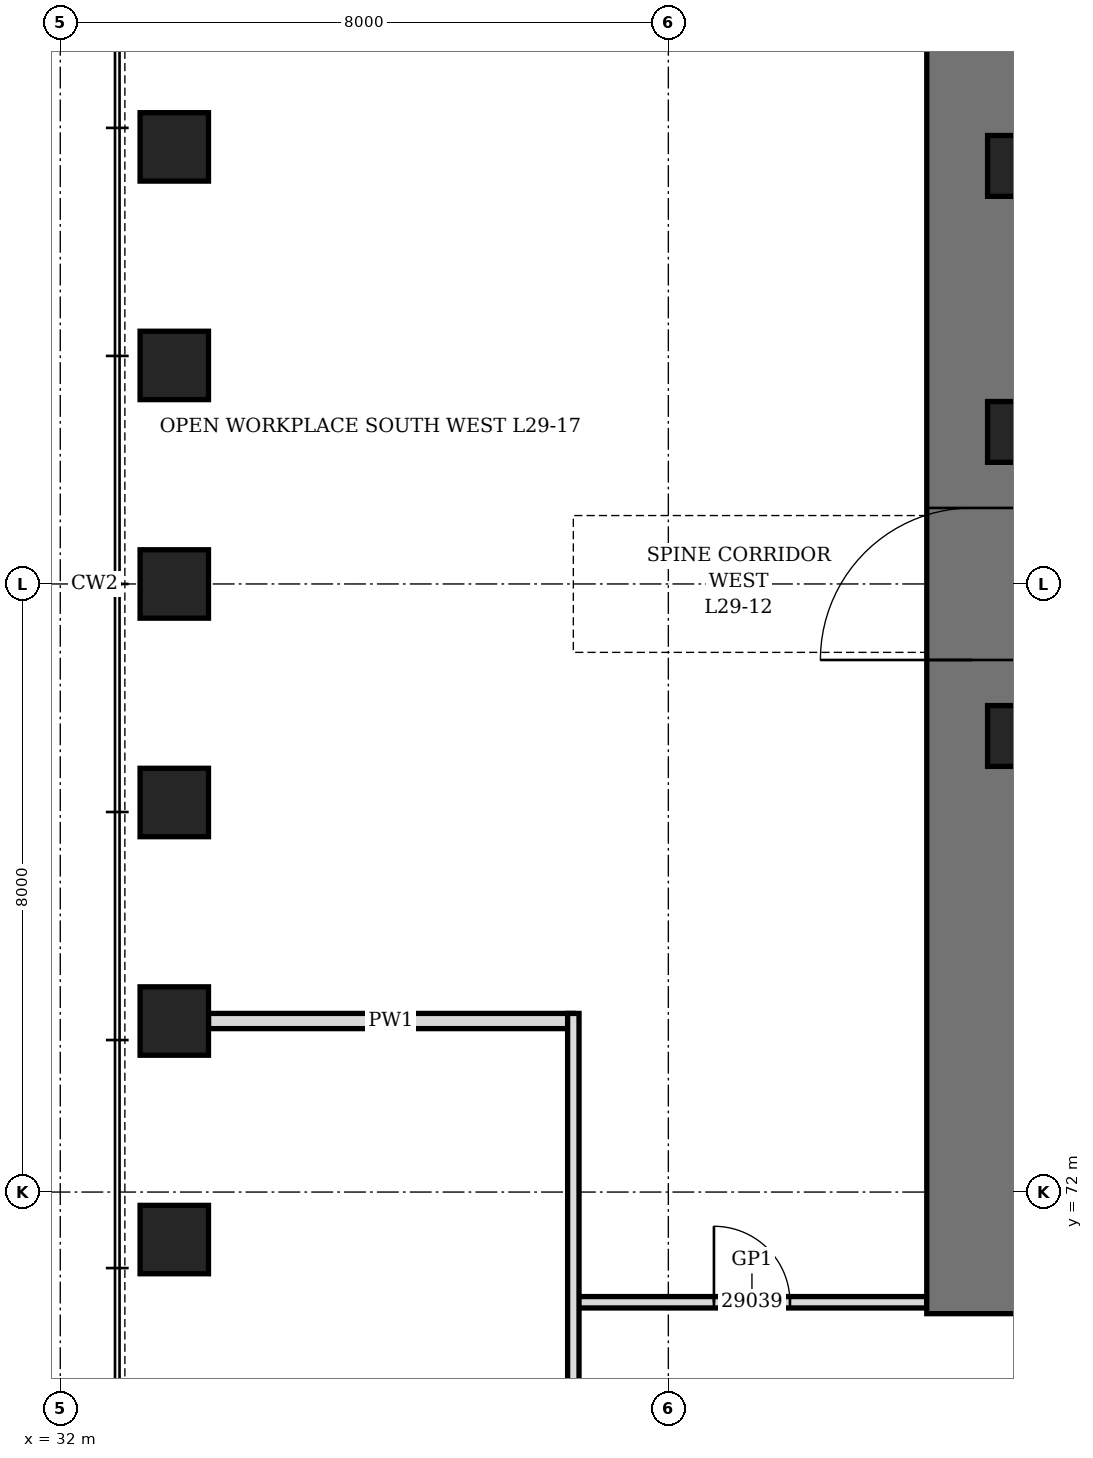
"""IFC4 building model, lengths in metres.
Left out: names, types, materials, properties, quantities, classifications, styles, units other than length and angle.
Written with IfcOpenShell. Run it as: python <this file> out.ifc"""

import sys

from ifc_helpers import new_model, si_unit, direction, frame, frame_2d, origin, origin_2d, place, context, subcontext, project, spatial, rectangle, hollow_rectangle, extrude, element, fill, save


model = new_model("IFC4")
c1 = context("Model", 3, precision=1e-05, world=origin(), true_north=direction((0.0, 1.0)))
c2 = subcontext(c1, "Body", "Model", "MODEL_VIEW")
j1 = project(units=[si_unit("LENGTHUNIT", "METRE"), si_unit("PLANEANGLEUNIT", "RADIAN")], contexts=[c1])
p1 = place(None, origin())
s1 = spatial("IfcSite", under=j1, at=p1, CompositionType="ELEMENT")
p2 = place(p1, origin())
s2 = spatial("IfcBuilding", under=s1, at=p2, CompositionType="ELEMENT")
p3 = place(p2, frame((0.0, 0.0, 133.3)))
s3 = spatial("IfcBuildingStorey", under=s2, at=p3, CompositionType="ELEMENT", Elevation=133.3)
for number, where, z_axis, x_axis in (
    (1, (33.5, 85.75, 0.0), (0.0, 0.0, 1.0), (0.0, 1.0, 0.0)),
    (2, (33.5, 82.875, 0.0), (0.0, 0.0, 1.0), (0.0, 1.0, 0.0)),
    (3, (33.5, 80.0, 0.0), (0.0, 0.0, 1.0), (0.0, 1.0, 0.0)),
    (4, (33.5, 77.125, 0.0), (0.0, 0.0, 1.0), (0.0, 1.0, 0.0)),
    (5, (33.5, 74.25, 0.0), (0.0, 0.0, 1.0), (0.0, 1.0, 0.0)),
    (6, (33.5, 71.375, 0.0), (0.0, 0.0, 1.0), (0.0, 1.0, 0.0)),
):
    element("IfcColumn", number, at=place(p3, frame(where, z_axis=z_axis, x_axis=x_axis)), inside=s3, PredefinedType="COLUMN", context=c2, shape_type="SweptSolid", body=[
        extrude(hollow_rectangle(XDim=0.9, YDim=0.9, WallThickness=0.15, at=origin_2d()), origin(), (0.0, 0.0, 1.0), 4.2),
    ])
p4 = place(p3, frame((44.0, 70.4, 0.0), z_axis=(0.0, 0.0, 1.0), x_axis=(0.0, 1.0, 0.0)))
e7 = element("IfcWall", 7, at=p4, inside=s3, PredefinedType="SHEAR", context=c2, shape_type="SweptSolid", body=[
    extrude(rectangle(XDim=19.2, YDim=1.2, at=frame_2d((9.6, 0.0))), origin(), (0.0, 0.0, 1.0), 4.2),
])
p5 = place(p4, frame((8.6, 0.0, 0.0)))
e8 = element("IfcOpeningElement", 8, at=p5, cuts=e7, PredefinedType="OPENING", context=c2, shape_type="SweptSolid", body=[
    extrude(rectangle(XDim=2.0, YDim=2.4, at=frame_2d((1.0, 1.2))), frame((0.0, 0.61, 0.0), z_axis=(0.0, -1.0, 0.0), x_axis=(1.0, 0.0, 0.0)), (0.0, 0.0, 1.0), 1.22),
])
for number, where, z_axis, x_axis in (
    (9, (44.6, 78.0, 0.0), (0.0, 0.0, 1.0), (1.0, 0.0, 0.0)),
    (10, (44.6, 82.0, 0.0), (0.0, 0.0, 1.0), (1.0, 0.0, 0.0)),
    (11, (44.6, 85.5, 0.0), (0.0, 0.0, 1.0), (1.0, 0.0, 0.0)),
):
    element("IfcColumn", number, at=place(p3, frame(where, z_axis=z_axis, x_axis=x_axis)), inside=s3, PredefinedType="COLUMN", context=c2, shape_type="SweptSolid", body=[
        extrude(hollow_rectangle(XDim=0.8, YDim=0.8, WallThickness=0.1, at=origin_2d()), origin(), (0.0, 0.0, 1.0), 4.2),
    ])
p6 = place(p3, frame((33.95, 74.25, 0.0), z_axis=(0.0, 0.0, 1.0), x_axis=(1.0, 0.0, 0.0)))
e12 = element("IfcWall", 12, at=p6, inside=s3, PredefinedType="PARTITIONING", context=c2, shape_type="SweptSolid", body=[
    extrude(rectangle(XDim=4.8, YDim=0.2, at=frame_2d((2.4, 0.0))), origin(), (0.0, 0.0, 1.0), 3.428),
])
p7 = place(p3, frame((38.8, 70.55, 0.0), z_axis=(0.0, 0.0, 1.0), x_axis=(1.0, 0.0, 0.0)))
e13 = element("IfcWall", 13, at=p7, inside=s3, PredefinedType="PARTITIONING", context=c2, shape_type="SweptSolid", body=[
    extrude(rectangle(XDim=4.6, YDim=0.15, at=frame_2d((2.3, 0.0))), origin(), (0.0, 0.0, 1.0), 4.04),
])
p8 = place(p7, frame((1.8, 0.0, 0.0)))
e14 = element("IfcOpeningElement", 14, at=p8, cuts=e13, PredefinedType="OPENING", context=c2, shape_type="SweptSolid", body=[
    extrude(rectangle(XDim=1.0, YDim=2.4, at=frame_2d((0.5, 1.2))), frame((0.0, 0.085, 0.0), z_axis=(0.0, -1.0, 0.0), x_axis=(1.0, 0.0, 0.0)), (0.0, 0.0, 1.0), 0.17),
])
p9 = place(p3, frame((38.75, 63.2, 0.0), z_axis=(0.0, 0.0, 1.0), x_axis=(0.0, 1.0, 0.0)))
e15 = element("IfcWall", 15, at=p9, inside=s3, PredefinedType="PARTITIONING", context=c2, shape_type="SweptSolid", body=[
    extrude(rectangle(XDim=11.15, YDim=0.15, at=frame_2d((5.575, 0.0))), origin(), (0.0, 0.0, 1.0), 4.04),
])
p10 = place(p9, frame((3.363, 0.0, 0.0)))
e16 = element("IfcOpeningElement", 16, at=p10, cuts=e15, PredefinedType="OPENING", context=c2, shape_type="SweptSolid", body=[
    extrude(rectangle(XDim=1.0, YDim=2.4, at=frame_2d((0.5, 1.2))), frame((0.0, 0.085, 0.0), z_axis=(0.0, -1.0, 0.0), x_axis=(1.0, 0.0, 0.0)), (0.0, 0.0, 1.0), 0.17),
])
p11 = place(p5, origin())
e17 = element("IfcDoor", 17, at=p11, inside=s3, OperationType="DOUBLE_DOOR_SINGLE_SWING", PredefinedType="DOOR", context=c2, shape_type="SweptSolid", body=[
    extrude(rectangle(XDim=2.0, YDim=2.4, at=frame_2d((1.0, 1.2))), frame((0.0, 0.35, 0.0), z_axis=(0.0, -1.0, 0.0), x_axis=(1.0, 0.0, 0.0)), (0.0, 0.0, 1.0), 0.7),
])
fill(e8, e17)
p12 = place(p8, origin())
e18 = element("IfcDoor", 18, at=p12, inside=s3, OperationType="SINGLE_SWING_RIGHT", PredefinedType="DOOR", context=c2, shape_type="SweptSolid", body=[
    extrude(rectangle(XDim=1.0, YDim=2.4, at=frame_2d((0.5, 1.2))), frame((0.0, 0.075, 0.0), z_axis=(0.0, -1.0, 0.0), x_axis=(1.0, 0.0, 0.0)), (0.0, 0.0, 1.0), 0.149),
])
fill(e14, e18)
save(model, sys.argv[1])
